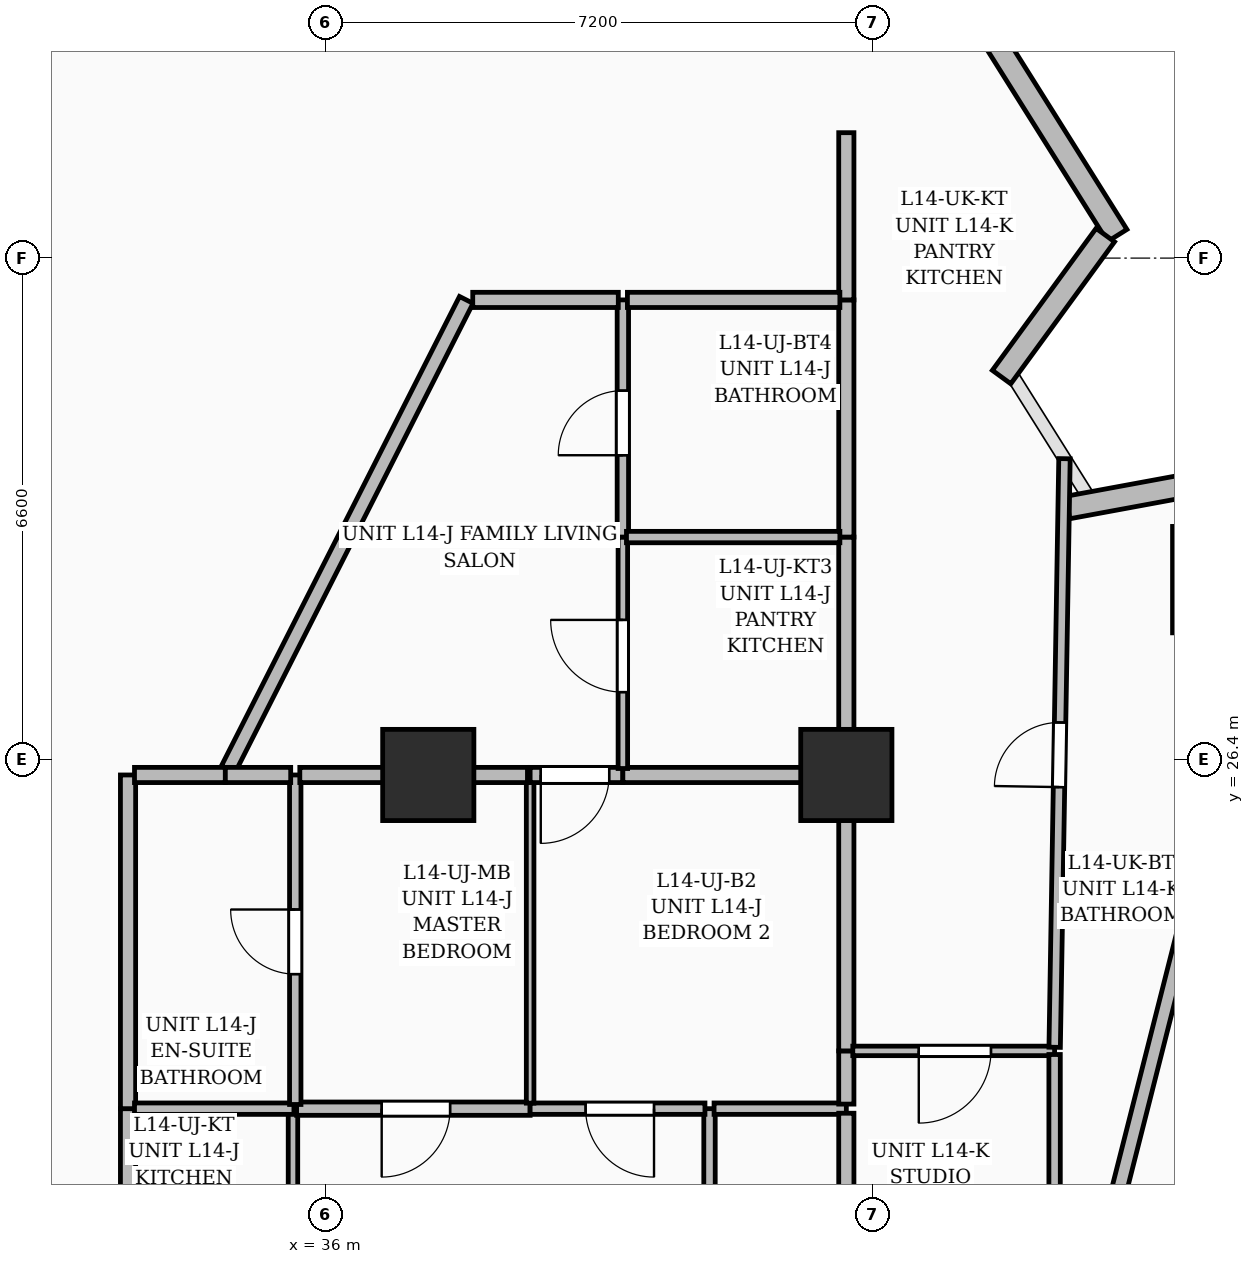
"""IFC4 building model, lengths in metres.
Left out: names, types, materials, properties, quantities, classifications, styles, units other than length and angle.
Written with IfcOpenShell. Run it as: python <this file> out.ifc"""

import sys

from ifc_helpers import new_model, si_unit, direction, frame, frame_2d, origin, origin_2d, place, context, subcontext, project, spatial, rectangle, extrude, element, fill, save


model = new_model("IFC4")
c1 = context("Model", 3, precision=1e-05, world=origin(), true_north=direction((0.0, 1.0)))
c2 = subcontext(c1, "Body", "Model", "MODEL_VIEW")
j1 = project(units=[si_unit("LENGTHUNIT", "METRE"), si_unit("PLANEANGLEUNIT", "RADIAN")], contexts=[c1])
p1 = place(None, origin())
s1 = spatial("IfcSite", under=j1, at=p1, CompositionType="ELEMENT")
p2 = place(p1, origin())
s2 = spatial("IfcBuilding", under=s1, at=p2, CompositionType="ELEMENT")
p3 = place(p2, frame((0.0, 0.0, 60.6)))
s3 = spatial("IfcBuildingStorey", under=s2, at=p3, CompositionType="ELEMENT", Elevation=60.6)
for number, where, z_axis, x_axis in (
    (1, (42.85, 26.2, 0.0), (0.0, 0.0, 1.0), (1.0, 0.0, 0.0)),
    (2, (37.35, 26.2, 0.0), (0.0, 0.0, 1.0), (1.0, 0.0, 0.0)),
):
    element("IfcColumn", number, at=place(p3, frame(where, z_axis=z_axis, x_axis=x_axis)), inside=s3, PredefinedType="COLUMN", context=c2, shape_type="SweptSolid", body=[
        extrude(rectangle(XDim=1.2, YDim=1.2, at=origin_2d()), origin(), (0.0, 0.0, 1.0), 3.6),
    ])
p4 = place(p3, frame((47.842, 28.77, 0.0), z_axis=(0.0, 0.0, 1.0), x_axis=(1.0, 0.0, 0.0)))
e3 = element("IfcColumn", 3, at=p4, inside=s3, PredefinedType="COLUMN", context=c2, shape_type="SweptSolid", body=[
    extrude(rectangle(XDim=1.4, YDim=1.4, at=origin_2d()), origin(), (0.0, 0.0, 1.0), 3.6),
])
p5 = place(p3, frame((42.703, 39.207, 0.0), z_axis=(0.0, 0.0, 1.0), x_axis=(0.531897092639, -0.846809000213, 0.0)))
e4 = element("IfcWall", 4, at=p5, inside=s3, PredefinedType="SOLIDWALL", context=c2, shape_type="SweptSolid", body=[
    extrude(rectangle(XDim=6.978, YDim=0.3, at=frame_2d((3.489, 0.0))), origin(), (0.0, 0.0, 1.0), 3.35),
])
p6 = place(p3, frame((46.257, 33.303, 0.0), z_axis=(0.0, 0.0, 1.0), x_axis=(-0.590008651796, -0.807396922713, 0.0)))
e5 = element("IfcWall", 5, at=p6, inside=s3, PredefinedType="SOLIDWALL", context=c2, shape_type="SweptSolid", body=[
    extrude(rectangle(XDim=2.313, YDim=0.3, at=frame_2d((1.157, 0.0))), origin(), (0.0, 0.0, 1.0), 2.375),
])
p7 = place(p3, frame((45.763, 29.719, 0.0), z_axis=(0.0, 0.0, 1.0), x_axis=(0.983400490727, 0.181448270416, 0.0)))
e6 = element("IfcWall", 6, at=p7, inside=s3, PredefinedType="SOLIDWALL", context=c2, shape_type="SweptSolid", body=[
    extrude(rectangle(XDim=2.782, YDim=0.3, at=frame_2d((1.391, 0.0))), origin(), (0.0, 0.0, 1.0), 2.375),
])
p8 = place(p3, frame((33.4, 17.835, 0.0), z_axis=(0.0, 0.0, 1.0), x_axis=(0.0, 1.0, 0.0)))
e7 = element("IfcWall", 7, at=p8, inside=s3, PredefinedType="PARTITIONING", context=c2, shape_type="SweptSolid", body=[
    extrude(rectangle(XDim=3.975, YDim=0.2, at=frame_2d((1.988, 0.0))), origin(), (0.0, 0.0, 1.0), 2.309),
])
p9 = place(p3, frame((33.4, 21.81, 0.0), z_axis=(0.0, 0.0, 1.0), x_axis=(0.0, 1.0, 0.0)))
e8 = element("IfcWall", 8, at=p9, inside=s3, PredefinedType="PARTITIONING", context=c2, shape_type="SweptSolid", body=[
    extrude(rectangle(XDim=4.39, YDim=0.2, at=frame_2d((2.195, 0.0))), origin(), (0.0, 0.0, 1.0), 2.712),
])
p10 = place(p3, frame((33.485, 26.2, 0.0), z_axis=(0.0, 0.0, 1.0), x_axis=(1.0, 0.0, 0.0)))
e9 = element("IfcWall", 9, at=p10, inside=s3, PredefinedType="PARTITIONING", context=c2, shape_type="SweptSolid", body=[
    extrude(rectangle(XDim=1.195, YDim=0.2, at=frame_2d((0.597, 0.0))), origin(), (0.0, 0.0, 1.0), 2.712),
])
p11 = place(p3, frame((34.719, 26.276, 0.0), z_axis=(0.0, 0.0, 1.0), x_axis=(0.452354999019, 0.891837964466, 0.0)))
e10 = element("IfcWall", 10, at=p11, inside=s3, PredefinedType="PARTITIONING", context=c2, shape_type="SweptSolid", body=[
    extrude(rectangle(XDim=6.923, YDim=0.2, at=frame_2d((3.461, 0.0))), origin(), (0.0, 0.0, 1.0), 2.279),
])
p12 = place(p3, frame((41.05, 17.835, 0.0), z_axis=(0.0, 0.0, 1.0), x_axis=(0.0, 1.0, 0.0)))
e11 = element("IfcWall", 11, at=p12, inside=s3, PredefinedType="PARTITIONING", context=c2, shape_type="SweptSolid", body=[
    extrude(rectangle(XDim=3.975, YDim=0.15, at=frame_2d((1.988, 0.0))), origin(), (0.0, 0.0, 1.0), 3.35),
])
p13 = place(p12, frame((1.579, 0.0, 0.0)))
e12 = element("IfcOpeningElement", 12, at=p13, cuts=e11, PredefinedType="OPENING", context=c2, shape_type="SweptSolid", body=[
    extrude(rectangle(XDim=0.85, YDim=2.1, at=frame_2d((0.425, 1.05))), frame((0.0, 0.085, 0.0), z_axis=(0.0, -1.0, 0.0), x_axis=(1.0, 0.0, 0.0)), (0.0, 0.0, 1.0), 0.17),
])
p14 = place(p3, frame((35.57, 21.81, 0.0), z_axis=(0.0, 0.0, 1.0), x_axis=(0.0, -1.0, 0.0)))
e13 = element("IfcWall", 13, at=p14, inside=s3, PredefinedType="PARTITIONING", context=c2, shape_type="SweptSolid", body=[
    extrude(rectangle(XDim=3.975, YDim=0.125, at=frame_2d((1.988, 0.0))), origin(), (0.0, 0.0, 1.0), 3.35),
])
p15 = place(p14, frame((1.555, 0.0, 0.0)))
e14 = element("IfcOpeningElement", 14, at=p15, cuts=e13, PredefinedType="OPENING", context=c2, shape_type="SweptSolid", body=[
    extrude(rectangle(XDim=0.95, YDim=2.2, at=frame_2d((0.475, 1.1))), frame((0.0, 0.072, 0.0), z_axis=(0.0, -1.0, 0.0), x_axis=(1.0, 0.0, 0.0)), (0.0, 0.0, 1.0), 0.145),
])
p16 = place(p3, frame((38.69, 21.81, 0.0), z_axis=(0.0, 0.0, 1.0), x_axis=(-1.0, 0.0, 0.0)))
e15 = element("IfcWall", 15, at=p16, inside=s3, PredefinedType="PARTITIONING", context=c2, shape_type="SweptSolid", body=[
    extrude(rectangle(XDim=3.073, YDim=0.175, at=frame_2d((1.536, 0.0))), origin(), (0.0, 0.0, 1.0), 3.35),
])
p17 = place(p16, frame((1.053, 0.0, 0.0)))
e16 = element("IfcOpeningElement", 16, at=p17, cuts=e15, PredefinedType="OPENING", context=c2, shape_type="SweptSolid", body=[
    extrude(rectangle(XDim=0.9, YDim=2.15, at=frame_2d((0.45, 1.075))), frame((0.0, 0.097, 0.0), z_axis=(0.0, -1.0, 0.0), x_axis=(1.0, 0.0, 0.0)), (0.0, 0.0, 1.0), 0.195),
])
p18 = place(p3, frame((40.99, 21.81, 0.0), z_axis=(0.0, 0.0, 1.0), x_axis=(-1.0, 0.0, 0.0)))
e17 = element("IfcWall", 17, at=p18, inside=s3, PredefinedType="PARTITIONING", context=c2, shape_type="SweptSolid", body=[
    extrude(rectangle(XDim=2.3, YDim=0.15, at=frame_2d((1.15, 0.0))), origin(), (0.0, 0.0, 1.0), 3.35),
])
p19 = place(p18, frame((0.67, 0.0, 0.0)))
e18 = element("IfcOpeningElement", 18, at=p19, cuts=e17, PredefinedType="OPENING", context=c2, shape_type="SweptSolid", body=[
    extrude(rectangle(XDim=0.9, YDim=2.15, at=frame_2d((0.45, 1.075))), frame((0.0, 0.085, 0.0), z_axis=(0.0, -1.0, 0.0), x_axis=(1.0, 0.0, 0.0)), (0.0, 0.0, 1.0), 0.17),
])
p20 = place(p3, frame((42.85, 21.81, 0.0), z_axis=(0.0, 0.0, 1.0), x_axis=(-1.0, 0.0, 0.0)))
e19 = element("IfcWall", 19, at=p20, inside=s3, PredefinedType="PARTITIONING", context=c2, shape_type="SweptSolid", body=[
    extrude(rectangle(XDim=1.74, YDim=0.15, at=frame_2d((0.87, 0.0))), origin(), (0.0, 0.0, 1.0), 3.35),
])
p21 = place(p3, frame((42.85, 17.835, 0.0), z_axis=(0.0, 0.0, 1.0), x_axis=(0.0, 1.0, 0.0)))
e20 = element("IfcWall", 20, at=p21, inside=s3, PredefinedType="PARTITIONING", context=c2, shape_type="SweptSolid", body=[
    extrude(rectangle(XDim=3.915, YDim=0.2, at=frame_2d((1.958, 0.0))), origin(), (0.0, 0.0, 1.0), 3.35),
])
p22 = place(p3, frame((35.583, 21.81, 0.0), z_axis=(0.0, 0.0, 1.0), x_axis=(-1.0, 0.0, 0.0)))
e21 = element("IfcWall", 21, at=p22, inside=s3, PredefinedType="PARTITIONING", context=c2, shape_type="SweptSolid", body=[
    extrude(rectangle(XDim=2.097, YDim=0.15, at=frame_2d((1.049, 0.0))), origin(), (0.0, 0.0, 1.0), 2.309),
])
p23 = place(p3, frame((38.69, 21.883, 0.0), z_axis=(0.0, 0.0, 1.0), x_axis=(0.0, 1.0, 0.0)))
e22 = element("IfcWall", 22, at=p23, inside=s3, PredefinedType="PARTITIONING", context=c2, shape_type="SweptSolid", body=[
    extrude(rectangle(XDim=4.317, YDim=0.1, at=frame_2d((2.159, 0.0))), origin(), (0.0, 0.0, 1.0), 2.37),
])
p24 = place(p3, frame((35.6, 21.865, 0.0), z_axis=(0.0, 0.0, 1.0), x_axis=(0.0, 1.0, 0.0)))
e23 = element("IfcWall", 23, at=p24, inside=s3, PredefinedType="PARTITIONING", context=c2, shape_type="SweptSolid", body=[
    extrude(rectangle(XDim=4.335, YDim=0.15, at=frame_2d((2.167, 0.0))), origin(), (0.0, 0.0, 1.0), 2.309),
])
p25 = place(p24, frame((1.715, 0.0, 0.0)))
e24 = element("IfcOpeningElement", 24, at=p25, cuts=e23, PredefinedType="OPENING", context=c2, shape_type="SweptSolid", body=[
    extrude(rectangle(XDim=0.85, YDim=2.1, at=frame_2d((0.425, 1.05))), frame((0.0, 0.085, 0.0), z_axis=(0.0, -1.0, 0.0), x_axis=(1.0, 0.0, 0.0)), (0.0, 0.0, 1.0), 0.17),
])
p26 = place(p3, frame((38.655, 26.2, 0.0), z_axis=(0.0, 0.0, 1.0), x_axis=(-1.0, 0.0, 0.0)))
e25 = element("IfcWall", 25, at=p26, inside=s3, PredefinedType="PARTITIONING", context=c2, shape_type="SweptSolid", body=[
    extrude(rectangle(XDim=2.995, YDim=0.2, at=frame_2d((1.498, 0.0))), origin(), (0.0, 0.0, 1.0), 2.37),
])
p27 = place(p3, frame((42.85, 21.87, 0.0), z_axis=(0.0, 0.0, 1.0), x_axis=(0.0, 1.0, 0.0)))
e26 = element("IfcWall", 26, at=p27, inside=s3, PredefinedType="PARTITIONING", context=c2, shape_type="SweptSolid", body=[
    extrude(rectangle(XDim=0.7, YDim=0.2, at=frame_2d((0.35, 0.0))), origin(), (0.0, 0.0, 1.0), 3.35),
])
p28 = place(p3, frame((42.85, 22.57, 0.0), z_axis=(0.0, 0.0, 1.0), x_axis=(0.0, 1.0, 0.0)))
e27 = element("IfcWall", 27, at=p28, inside=s3, PredefinedType="PARTITIONING", context=c2, shape_type="SweptSolid", body=[
    extrude(rectangle(XDim=3.63, YDim=0.2, at=frame_2d((1.815, 0.0))), origin(), (0.0, 0.0, 1.0), 2.309),
])
p29 = place(p3, frame((39.91, 26.2, 0.0), z_axis=(0.0, 0.0, 1.0), x_axis=(-1.0, 0.0, 0.0)))
e28 = element("IfcWall", 28, at=p29, inside=s3, PredefinedType="PARTITIONING", context=c2, shape_type="SweptSolid", body=[
    extrude(rectangle(XDim=1.22, YDim=0.2, at=frame_2d((0.61, 0.0))), origin(), (0.0, 0.0, 1.0), 2.37),
])
p30 = place(p29, frame((0.18, 0.0, 0.0)))
e29 = element("IfcOpeningElement", 29, at=p30, cuts=e28, PredefinedType="OPENING", context=c2, shape_type="SweptSolid", body=[
    extrude(rectangle(XDim=0.9, YDim=2.1, at=frame_2d((0.45, 1.05))), frame((0.0, 0.11, 0.0), z_axis=(0.0, -1.0, 0.0), x_axis=(1.0, 0.0, 0.0)), (0.0, 0.0, 1.0), 0.22),
])
p31 = place(p3, frame((42.765, 26.2, 0.0), z_axis=(0.0, 0.0, 1.0), x_axis=(-1.0, 0.0, 0.0)))
e30 = element("IfcWall", 30, at=p31, inside=s3, PredefinedType="PARTITIONING", context=c2, shape_type="SweptSolid", body=[
    extrude(rectangle(XDim=2.855, YDim=0.2, at=frame_2d((1.427, 0.0))), origin(), (0.0, 0.0, 1.0), 2.37),
])
p32 = place(p3, frame((35.54, 26.2, 0.0), z_axis=(0.0, 0.0, 1.0), x_axis=(-1.0, 0.0, 0.0)))
e31 = element("IfcWall", 31, at=p32, inside=s3, PredefinedType="PARTITIONING", context=c2, shape_type="SweptSolid", body=[
    extrude(rectangle(XDim=0.86, YDim=0.2, at=frame_2d((0.43, 0.0))), origin(), (0.0, 0.0, 1.0), 3.35),
])
p33 = place(p3, frame((45.59, 22.57, 0.0), z_axis=(0.0, 0.0, 1.0), x_axis=(-1.0, 0.0, 0.0)))
e32 = element("IfcWall", 32, at=p33, inside=s3, PredefinedType="PARTITIONING", context=c2, shape_type="SweptSolid", body=[
    extrude(rectangle(XDim=2.655, YDim=0.125, at=frame_2d((1.328, 0.0))), origin(), (0.0, 0.0, 1.0), 2.309),
])
p34 = place(p33, frame((0.837, 0.0, 0.0)))
e33 = element("IfcOpeningElement", 33, at=p34, cuts=e32, PredefinedType="OPENING", context=c2, shape_type="SweptSolid", body=[
    extrude(rectangle(XDim=0.95, YDim=2.2, at=frame_2d((0.475, 1.1))), frame((0.0, 0.072, 0.0), z_axis=(0.0, -1.0, 0.0), x_axis=(1.0, 0.0, 0.0)), (0.0, 0.0, 1.0), 0.145),
])
p35 = place(p3, frame((45.59, 18.049, 0.0), z_axis=(0.0, 0.0, 1.0), x_axis=(0.0, 1.0, 0.0)))
e34 = element("IfcWall", 34, at=p35, inside=s3, PredefinedType="PARTITIONING", context=c2, shape_type="SweptSolid", body=[
    extrude(rectangle(XDim=4.473, YDim=0.15, at=frame_2d((2.237, 0.0))), origin(), (0.0, 0.0, 1.0), 2.279),
])
p36 = place(p3, frame((45.591, 22.617, 0.0), z_axis=(0.0, 0.0, 1.0), x_axis=(0.016675907723, 0.999860947383, 0.0)))
e35 = element("IfcWall", 35, at=p36, inside=s3, PredefinedType="PARTITIONING", context=c2, shape_type="SweptSolid", body=[
    extrude(rectangle(XDim=7.745, YDim=0.15, at=frame_2d((3.872, 0.0))), origin(), (0.0, 0.0, 1.0), 2.712),
])
p37 = place(p36, frame((3.424, 0.0, 0.0)))
e36 = element("IfcOpeningElement", 36, at=p37, cuts=e35, PredefinedType="OPENING", context=c2, shape_type="SweptSolid", body=[
    extrude(rectangle(XDim=0.85, YDim=2.1, at=frame_2d((0.425, 1.05))), frame((0.0, 0.085, 0.0), z_axis=(0.0, -1.0, 0.0), x_axis=(1.0, 0.0, 0.0)), (0.0, 0.0, 1.0), 0.17),
])
p38 = place(p3, frame((42.85, 29.33, 0.0), z_axis=(0.0, 0.0, 1.0), x_axis=(0.0, -1.0, 0.0)))
e37 = element("IfcWall", 37, at=p38, inside=s3, PredefinedType="PARTITIONING", context=c2, shape_type="SweptSolid", body=[
    extrude(rectangle(XDim=3.13, YDim=0.2, at=frame_2d((1.565, 0.0))), origin(), (0.0, 0.0, 1.0), 2.279),
])
p39 = place(p3, frame((42.85, 32.45, 0.0), z_axis=(0.0, 0.0, 1.0), x_axis=(0.0, -1.0, 0.0)))
e38 = element("IfcWall", 38, at=p39, inside=s3, PredefinedType="PARTITIONING", context=c2, shape_type="SweptSolid", body=[
    extrude(rectangle(XDim=3.12, YDim=0.2, at=frame_2d((1.56, 0.0))), origin(), (0.0, 0.0, 1.0), 2.279),
])
p40 = place(p3, frame((42.85, 34.65, 0.0), z_axis=(0.0, 0.0, 1.0), x_axis=(0.0, -1.0, 0.0)))
e39 = element("IfcWall", 39, at=p40, inside=s3, PredefinedType="PARTITIONING", context=c2, shape_type="SweptSolid", body=[
    extrude(rectangle(XDim=2.2, YDim=0.2, at=frame_2d((1.1, 0.0))), origin(), (0.0, 0.0, 1.0), 2.712),
])
p41 = place(p3, frame((45.701, 17.833, 0.0), z_axis=(0.0, 0.0, 1.0), x_axis=(0.246225051857, 0.969212682458, 0.0)))
e40 = element("IfcWall", 40, at=p41, inside=s3, PredefinedType="PARTITIONING", context=c2, shape_type="SweptSolid", body=[
    extrude(rectangle(XDim=12.014, YDim=0.2, at=frame_2d((6.007, 0.0))), origin(), (0.0, 0.0, 1.0), 2.309),
])
p42 = place(p3, frame((39.91, 26.285, 0.0), z_axis=(0.0, 0.0, 1.0), x_axis=(0.0, 1.0, 0.0)))
e41 = element("IfcWall", 41, at=p42, inside=s3, PredefinedType="PARTITIONING", context=c2, shape_type="SweptSolid", body=[
    extrude(rectangle(XDim=3.045, YDim=0.125, at=frame_2d((1.522, 0.0))), origin(), (0.0, 0.0, 1.0), 2.37),
])
p43 = place(p42, frame((1.005, 0.0, 0.0)))
e42 = element("IfcOpeningElement", 42, at=p43, cuts=e41, PredefinedType="OPENING", context=c2, shape_type="SweptSolid", body=[
    extrude(rectangle(XDim=0.95, YDim=2.2, at=frame_2d((0.475, 1.1))), frame((0.0, 0.072, 0.0), z_axis=(0.0, -1.0, 0.0), x_axis=(1.0, 0.0, 0.0)), (0.0, 0.0, 1.0), 0.145),
])
p44 = place(p3, frame((39.91, 29.33, 0.0), z_axis=(0.0, 0.0, 1.0), x_axis=(0.0, 1.0, 0.0)))
e43 = element("IfcWall", 43, at=p44, inside=s3, PredefinedType="PARTITIONING", context=c2, shape_type="SweptSolid", body=[
    extrude(rectangle(XDim=3.12, YDim=0.15, at=frame_2d((1.56, 0.0))), origin(), (0.0, 0.0, 1.0), 2.712),
])
p45 = place(p44, frame((1.076, 0.0, 0.0)))
e44 = element("IfcOpeningElement", 44, at=p45, cuts=e43, PredefinedType="OPENING", context=c2, shape_type="SweptSolid", body=[
    extrude(rectangle(XDim=0.85, YDim=2.1, at=frame_2d((0.425, 1.05))), frame((0.0, 0.085, 0.0), z_axis=(0.0, -1.0, 0.0), x_axis=(1.0, 0.0, 0.0)), (0.0, 0.0, 1.0), 0.17),
])
p46 = place(p3, frame((42.765, 29.33, 0.0), z_axis=(0.0, 0.0, 1.0), x_axis=(-1.0, 0.0, 0.0)))
e45 = element("IfcWall", 45, at=p46, inside=s3, PredefinedType="PARTITIONING", context=c2, shape_type="SweptSolid", body=[
    extrude(rectangle(XDim=2.807, YDim=0.15, at=frame_2d((1.404, 0.0))), origin(), (0.0, 0.0, 1.0), 2.279),
])
p47 = place(p3, frame((42.765, 32.45, 0.0), z_axis=(0.0, 0.0, 1.0), x_axis=(-1.0, 0.0, 0.0)))
e46 = element("IfcWall", 46, at=p47, inside=s3, PredefinedType="PARTITIONING", context=c2, shape_type="SweptSolid", body=[
    extrude(rectangle(XDim=2.795, YDim=0.2, at=frame_2d((1.397, 0.0))), origin(), (0.0, 0.0, 1.0), 2.279),
])
p48 = place(p3, frame((37.935, 32.45, 0.0), z_axis=(0.0, 0.0, 1.0), x_axis=(1.0, 0.0, 0.0)))
e47 = element("IfcWall", 47, at=p48, inside=s3, PredefinedType="PARTITIONING", context=c2, shape_type="SweptSolid", body=[
    extrude(rectangle(XDim=1.915, YDim=0.2, at=frame_2d((0.958, 0.0))), origin(), (0.0, 0.0, 1.0), 3.35),
])
p49 = place(p17, origin())
e48 = element("IfcDoor", 48, at=p49, inside=s3, OperationType="SINGLE_SWING_RIGHT", PredefinedType="DOOR", context=c2, shape_type="SweptSolid", body=[
    extrude(rectangle(XDim=0.9, YDim=2.15, at=frame_2d((0.45, 1.075))), frame((0.0, 0.025, 0.0), z_axis=(0.0, -1.0, 0.0), x_axis=(1.0, 0.0, 0.0)), (0.0, 0.0, 1.0), 0.05),
])
fill(e16, e48)
p50 = place(p19, origin())
e49 = element("IfcDoor", 49, at=p50, inside=s3, OperationType="SINGLE_SWING_LEFT", PredefinedType="DOOR", context=c2, shape_type="SweptSolid", body=[
    extrude(rectangle(XDim=0.9, YDim=2.15, at=frame_2d((0.45, 1.075))), frame((0.0, 0.025, 0.0), z_axis=(0.0, -1.0, 0.0), x_axis=(1.0, 0.0, 0.0)), (0.0, 0.0, 1.0), 0.05),
])
fill(e18, e49)
p51 = place(p25, origin())
e50 = element("IfcDoor", 50, at=p51, inside=s3, OperationType="SINGLE_SWING_RIGHT", PredefinedType="DOOR", context=c2, shape_type="SweptSolid", body=[
    extrude(rectangle(XDim=0.85, YDim=2.1, at=frame_2d((0.425, 1.05))), frame((0.0, 0.025, 0.0), z_axis=(0.0, -1.0, 0.0), x_axis=(1.0, 0.0, 0.0)), (0.0, 0.0, 1.0), 0.05),
])
fill(e24, e50)
p52 = place(p34, origin())
e51 = element("IfcDoor", 51, at=p52, inside=s3, OperationType="SINGLE_SWING_RIGHT", PredefinedType="DOOR", context=c2, shape_type="SweptSolid", body=[
    extrude(rectangle(XDim=0.95, YDim=2.2, at=frame_2d((0.475, 1.1))), frame((0.0, 0.025, 0.0), z_axis=(0.0, -1.0, 0.0), x_axis=(1.0, 0.0, 0.0)), (0.0, 0.0, 1.0), 0.05),
])
fill(e33, e51)
p53 = place(p37, origin())
e52 = element("IfcDoor", 52, at=p53, inside=s3, OperationType="SINGLE_SWING_LEFT", PredefinedType="DOOR", context=c2, shape_type="SweptSolid", body=[
    extrude(rectangle(XDim=0.85, YDim=2.1, at=frame_2d((0.425, 1.05))), frame((0.0, 0.025, 0.0), z_axis=(0.0, -1.0, 0.0), x_axis=(1.0, 0.0, 0.0)), (0.0, 0.0, 1.0), 0.05),
])
fill(e36, e52)
p54 = place(p43, origin())
e53 = element("IfcDoor", 53, at=p54, inside=s3, OperationType="SINGLE_SWING_RIGHT", PredefinedType="DOOR", context=c2, shape_type="SweptSolid", body=[
    extrude(rectangle(XDim=0.95, YDim=2.2, at=frame_2d((0.475, 1.1))), frame((0.0, 0.025, 0.0), z_axis=(0.0, -1.0, 0.0), x_axis=(1.0, 0.0, 0.0)), (0.0, 0.0, 1.0), 0.05),
])
fill(e42, e53)
p55 = place(p45, origin())
e54 = element("IfcDoor", 54, at=p55, inside=s3, OperationType="SINGLE_SWING_LEFT", PredefinedType="DOOR", context=c2, shape_type="SweptSolid", body=[
    extrude(rectangle(XDim=0.85, YDim=2.1, at=frame_2d((0.425, 1.05))), frame((0.0, 0.025, 0.0), z_axis=(0.0, -1.0, 0.0), x_axis=(1.0, 0.0, 0.0)), (0.0, 0.0, 1.0), 0.05),
])
fill(e44, e54)
p56 = place(p30, origin())
e55 = element("IfcDoor", 55, at=p56, inside=s3, OperationType="SINGLE_SWING_RIGHT", PredefinedType="DOOR", context=c2, shape_type="SweptSolid", body=[
    extrude(rectangle(XDim=0.9, YDim=2.1, at=frame_2d((0.45, 1.05))), frame((0.0, 0.025, 0.0), z_axis=(0.0, -1.0, 0.0), x_axis=(1.0, 0.0, 0.0)), (0.0, 0.0, 1.0), 0.05),
])
fill(e29, e55)
save(model, sys.argv[1])
